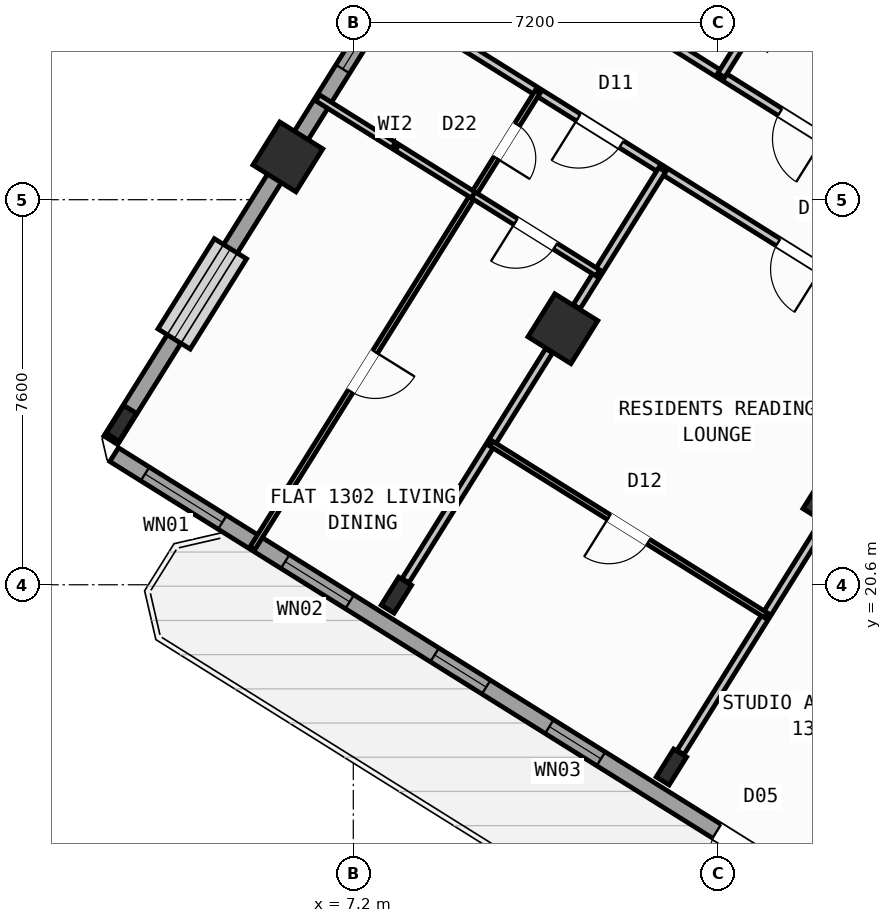
"""IFC4 building model, lengths in metres.
Left out: names, types, materials, properties, quantities, classifications, styles, units other than length and angle.
Written with IfcOpenShell. Run it as: python <this file> out.ifc"""

import sys

from ifc_helpers import new_model, si_unit, direction, frame, frame_2d, origin, origin_2d, place, context, subcontext, project, spatial, rectangle, hollow_rectangle, i_section, extrude, source, transform, mapped, element, fill, save


model = new_model("IFC4")
c1 = context("Model", 3, precision=1e-05, world=origin(), true_north=direction((0.0, 1.0)))
c2 = subcontext(c1, "Body", "Model", "MODEL_VIEW")
j1 = project(units=[si_unit("LENGTHUNIT", "METRE"), si_unit("PLANEANGLEUNIT", "RADIAN")], contexts=[c1])
p1 = place(None, origin())
s1 = spatial("IfcSite", under=j1, at=p1, CompositionType="ELEMENT")
p2 = place(p1, origin())
s2 = spatial("IfcBuilding", under=s1, at=p2, CompositionType="ELEMENT")
p3 = place(p2, frame((0.0, 0.0, 52.8)))
s3 = spatial("IfcBuildingStorey", under=s2, at=p3, CompositionType="ELEMENT", Elevation=52.8)
m1 = source(origin(), c2, "Body", "SweptSolid", [
    extrude(hollow_rectangle(XDim=1.0, YDim=1.0, WallThickness=0.04, at=origin_2d()), origin(), (0.0, 0.0, 1.0), 3.6),
])
p4 = place(p3, frame((16.764, 22.261, 0.0), z_axis=(0.0, 0.0, 1.0), x_axis=(-0.848048096156, 0.529919264233, 0.0)))
e1 = element("IfcColumn", 1, at=p4, inside=s3, PredefinedType="COLUMN", context=c2, shape_type="MappedRepresentation", body=[
    mapped(m1, transform((0.0, 0.0, 0.0), scale=1.0)),
])
m2 = source(origin(), c2, "Body", "SweptSolid", [
    extrude(i_section(OverallWidth=0.3, OverallDepth=0.65, WebThickness=0.016, FlangeThickness=0.031, at=origin_2d()), origin(), (0.0, 0.0, 1.0), 3.6),
])
p5 = place(p3, frame((13.478, 17.003, 0.0), z_axis=(0.0, 0.0, 1.0), x_axis=(-0.848048096156, 0.529919264233, 0.0)))
e2 = element("IfcColumn", 2, at=p5, inside=s3, PredefinedType="COLUMN", context=c2, shape_type="MappedRepresentation", body=[
    mapped(m2, transform((0.0, 0.0, 0.0), scale=1.0)),
])
p6 = place(p3, frame((11.336, 25.653, 0.0), z_axis=(0.0, 0.0, 1.0), x_axis=(-0.848048096156, 0.529919264233, 0.0)))
e3 = element("IfcColumn", 3, at=p6, inside=s3, PredefinedType="COLUMN", context=c2, shape_type="MappedRepresentation", body=[
    mapped(m1, transform((0.0, 0.0, 0.0), scale=1.0)),
])
p7 = place(p3, frame((8.051, 20.395, 0.0), z_axis=(0.0, 0.0, 1.0), x_axis=(-0.848048096156, 0.529919264233, 0.0)))
e4 = element("IfcColumn", 4, at=p7, inside=s3, PredefinedType="COLUMN", context=c2, shape_type="MappedRepresentation", body=[
    mapped(m2, transform((0.0, 0.0, 0.0), scale=1.0)),
])
p8 = place(p3, frame((5.909, 29.044, 0.0), z_axis=(0.0, 0.0, 1.0), x_axis=(-0.848048096156, 0.529919264233, 0.0)))
e5 = element("IfcColumn", 5, at=p8, inside=s3, PredefinedType="COLUMN", context=c2, shape_type="MappedRepresentation", body=[
    mapped(m1, transform((0.0, 0.0, 0.0), scale=1.0)),
])
p9 = place(p3, frame((2.623, 23.786, 0.0), z_axis=(0.0, 0.0, 1.0), x_axis=(-0.848048096156, 0.529919264233, 0.0)))
e6 = element("IfcColumn", 6, at=p9, inside=s3, PredefinedType="COLUMN", context=c2, shape_type="MappedRepresentation", body=[
    mapped(m2, transform((0.0, 0.0, 0.0), scale=1.0)),
])
p10 = place(p3, frame((29.268, 6.429, 0.0), z_axis=(0.0, 0.0, 1.0), x_axis=(-0.848049971435, 0.529916263149, 0.0)))
e7 = element("IfcWall", 7, at=p10, inside=s3, PredefinedType="STANDARD", context=c2, shape_type="SweptSolid", body=[
    extrude(rectangle(XDim=31.588, YDim=0.32, at=frame_2d((15.794, 0.0))), origin(), (0.0, 0.0, 1.0), 3.35),
])
p11 = place(p10, frame((16.362, 0.0, 0.0)))
e8 = element("IfcOpeningElement", 8, at=p11, cuts=e7, PredefinedType="OPENING", context=c2, shape_type="SweptSolid", body=[
    extrude(rectangle(XDim=1.2, YDim=2.15, at=frame_2d((0.6, 1.075))), frame((0.0, 0.17, 0.0), z_axis=(0.0, -1.0, 0.0), x_axis=(1.0, 0.0, 0.0)), (0.0, 0.0, 1.0), 0.34),
])
p12 = place(p10, frame((2.989, 0.0, 0.8)))
e9 = element("IfcOpeningElement", 9, at=p12, cuts=e7, PredefinedType="OPENING", context=c2, shape_type="SweptSolid", body=[
    extrude(rectangle(XDim=2.1, YDim=1.55, at=frame_2d((1.05, 0.775))), frame((0.0, 0.17, 0.0), z_axis=(0.0, -1.0, 0.0), x_axis=(1.0, 0.0, 0.0)), (0.0, 0.0, 1.0), 0.34),
])
p13 = place(p10, frame((8.359, 0.0, 0.8)))
e10 = element("IfcOpeningElement", 10, at=p13, cuts=e7, PredefinedType="OPENING", context=c2, shape_type="SweptSolid", body=[
    extrude(rectangle(XDim=2.1, YDim=1.55, at=frame_2d((1.05, 0.775))), frame((0.0, 0.17, 0.0), z_axis=(0.0, -1.0, 0.0), x_axis=(1.0, 0.0, 0.0)), (0.0, 0.0, 1.0), 0.34),
])
p14 = place(p10, frame((13.284, 0.0, 0.95)))
e11 = element("IfcOpeningElement", 11, at=p14, cuts=e7, PredefinedType="OPENING", context=c2, shape_type="SweptSolid", body=[
    extrude(rectangle(XDim=1.2, YDim=1.4, at=frame_2d((0.6, 0.7))), frame((0.0, 0.17, 0.0), z_axis=(0.0, -1.0, 0.0), x_axis=(1.0, 0.0, 0.0)), (0.0, 0.0, 1.0), 0.34),
])
p15 = place(p10, frame((20.259, 0.0, 0.95)))
e12 = element("IfcOpeningElement", 12, at=p15, cuts=e7, PredefinedType="OPENING", context=c2, shape_type="SweptSolid", body=[
    extrude(rectangle(XDim=1.2, YDim=1.4, at=frame_2d((0.6, 0.7))), frame((0.0, 0.17, 0.0), z_axis=(0.0, -1.0, 0.0), x_axis=(1.0, 0.0, 0.0)), (0.0, 0.0, 1.0), 0.34),
])
p16 = place(p10, frame((22.929, 0.0, 0.95)))
e13 = element("IfcOpeningElement", 13, at=p16, cuts=e7, PredefinedType="OPENING", context=c2, shape_type="SweptSolid", body=[
    extrude(rectangle(XDim=1.2, YDim=1.4, at=frame_2d((0.6, 0.7))), frame((0.0, 0.17, 0.0), z_axis=(0.0, -1.0, 0.0), x_axis=(1.0, 0.0, 0.0)), (0.0, 0.0, 1.0), 0.34),
])
p17 = place(p10, frame((26.106, 0.0, 0.85)))
e14 = element("IfcOpeningElement", 14, at=p17, cuts=e7, PredefinedType="OPENING", context=c2, shape_type="SweptSolid", body=[
    extrude(rectangle(XDim=1.5, YDim=1.5, at=frame_2d((0.75, 0.75))), frame((0.0, 0.17, 0.0), z_axis=(0.0, -1.0, 0.0), x_axis=(1.0, 0.0, 0.0)), (0.0, 0.0, 1.0), 0.34),
])
p18 = place(p10, frame((29.068, 0.0, 0.85)))
e15 = element("IfcOpeningElement", 15, at=p18, cuts=e7, PredefinedType="OPENING", context=c2, shape_type="SweptSolid", body=[
    extrude(rectangle(XDim=1.8, YDim=1.5, at=frame_2d((0.9, 0.75))), frame((0.0, 0.17, 0.0), z_axis=(0.0, -1.0, 0.0), x_axis=(1.0, 0.0, 0.0)), (0.0, 0.0, 1.0), 0.34),
])
p19 = place(p3, frame((2.415, 23.452, 0.0), z_axis=(0.0, 0.0, 1.0), x_axis=(0.52991049553, 0.848053575387, 0.0)))
e16 = element("IfcWall", 16, at=p19, inside=s3, PredefinedType="STANDARD", context=c2, shape_type="SweptSolid", body=[
    extrude(rectangle(XDim=21.587, YDim=0.32, at=frame_2d((10.794, 0.0))), origin(), (0.0, 0.0, 1.0), 2.725),
])
p20 = place(p19, frame((2.356, 0.0, 0.8)))
e17 = element("IfcOpeningElement", 17, at=p20, cuts=e16, PredefinedType="OPENING", context=c2, shape_type="SweptSolid", body=[
    extrude(rectangle(XDim=2.1, YDim=1.55, at=frame_2d((1.05, 0.775))), frame((0.0, 0.17, 0.0), z_axis=(0.0, -1.0, 0.0), x_axis=(1.0, 0.0, 0.0)), (0.0, 0.0, 1.0), 0.34),
])
p21 = place(p19, frame((8.639, 0.0, 1.0)))
e18 = element("IfcOpeningElement", 18, at=p21, cuts=e16, PredefinedType="OPENING", context=c2, shape_type="SweptSolid", body=[
    extrude(rectangle(XDim=0.9, YDim=1.25, at=frame_2d((0.45, 0.625))), frame((0.0, 0.17, 0.0), z_axis=(0.0, -1.0, 0.0), x_axis=(1.0, 0.0, 0.0)), (0.0, 0.0, 1.0), 0.34),
])
p22 = place(p19, frame((17.129, 0.0, 0.85)))
e19 = element("IfcOpeningElement", 19, at=p22, cuts=e16, PredefinedType="OPENING", context=c2, shape_type="SweptSolid", body=[
    extrude(rectangle(XDim=1.5, YDim=1.5, at=frame_2d((0.75, 0.75))), frame((0.0, 0.17, 0.0), z_axis=(0.0, -1.0, 0.0), x_axis=(1.0, 0.0, 0.0)), (0.0, 0.0, 1.0), 0.34),
])
p23 = place(p3, frame((14.138, 41.825, 0.0), z_axis=(0.0, 0.0, 1.0), x_axis=(0.848046498049, -0.529921821731, 0.0)))
e20 = element("IfcWall", 20, at=p23, inside=s3, PredefinedType="STANDARD", context=c2, shape_type="SweptSolid", body=[
    extrude(rectangle(XDim=31.588, YDim=0.32, at=frame_2d((15.794, 0.0))), origin(), (0.0, 0.0, 1.0), 3.35),
])
p24 = place(p23, frame((3.159, 0.0, 0.0)))
e21 = element("IfcOpeningElement", 21, at=p24, cuts=e20, PredefinedType="OPENING", context=c2, shape_type="SweptSolid", body=[
    extrude(rectangle(XDim=1.05, YDim=2.15, at=frame_2d((0.525, 1.075))), frame((0.0, 0.17, 0.0), z_axis=(0.0, -1.0, 0.0), x_axis=(1.0, 0.0, 0.0)), (0.0, 0.0, 1.0), 0.34),
])
p25 = place(p23, frame((0.906, 0.0, 1.0)))
e22 = element("IfcOpeningElement", 22, at=p25, cuts=e20, PredefinedType="OPENING", context=c2, shape_type="SweptSolid", body=[
    extrude(rectangle(XDim=0.9, YDim=1.25, at=frame_2d((0.45, 0.625))), frame((0.0, 0.17, 0.0), z_axis=(0.0, -1.0, 0.0), x_axis=(1.0, 0.0, 0.0)), (0.0, 0.0, 1.0), 0.34),
])
p26 = place(p23, frame((9.537, 0.0, 0.85)))
e23 = element("IfcOpeningElement", 23, at=p26, cuts=e20, PredefinedType="OPENING", context=c2, shape_type="SweptSolid", body=[
    extrude(rectangle(XDim=1.8, YDim=1.5, at=frame_2d((0.9, 0.75))), frame((0.0, 0.17, 0.0), z_axis=(0.0, -1.0, 0.0), x_axis=(1.0, 0.0, 0.0)), (0.0, 0.0, 1.0), 0.34),
])
p27 = place(p23, frame((13.899, 0.0, 0.85)))
e24 = element("IfcOpeningElement", 24, at=p27, cuts=e20, PredefinedType="OPENING", context=c2, shape_type="SweptSolid", body=[
    extrude(rectangle(XDim=1.5, YDim=1.5, at=frame_2d((0.75, 0.75))), frame((0.0, 0.17, 0.0), z_axis=(0.0, -1.0, 0.0), x_axis=(1.0, 0.0, 0.0)), (0.0, 0.0, 1.0), 0.34),
])
p28 = place(p23, frame((22.019, 0.0, 0.95)))
e25 = element("IfcOpeningElement", 25, at=p28, cuts=e20, PredefinedType="OPENING", context=c2, shape_type="SweptSolid", body=[
    extrude(rectangle(XDim=1.2, YDim=1.4, at=frame_2d((0.6, 0.7))), frame((0.0, 0.17, 0.0), z_axis=(0.0, -1.0, 0.0), x_axis=(1.0, 0.0, 0.0)), (0.0, 0.0, 1.0), 0.34),
])
p29 = place(p23, frame((27.569, 0.0, 0.95)))
e26 = element("IfcOpeningElement", 26, at=p29, cuts=e20, PredefinedType="OPENING", context=c2, shape_type="SweptSolid", body=[
    extrude(rectangle(XDim=1.2, YDim=1.4, at=frame_2d((0.6, 0.7))), frame((0.0, 0.17, 0.0), z_axis=(0.0, -1.0, 0.0), x_axis=(1.0, 0.0, 0.0)), (0.0, 0.0, 1.0), 0.34),
])
p30 = place(p3, frame((23.104, 25.256, 0.0), z_axis=(0.0, 0.0, 1.0), x_axis=(-0.848041752158, 0.529929416617, 0.0)))
e27 = element("IfcWall", 27, at=p30, inside=s3, PredefinedType="PARTITIONING", context=c2, shape_type="SweptSolid", body=[
    extrude(rectangle(XDim=16.73, YDim=0.16, at=frame_2d((8.365, 0.0))), origin(), (0.0, 0.0, 1.0), 3.34),
])
p31 = place(p30, frame((1.395, 0.0, 0.0)))
e28 = element("IfcOpeningElement", 28, at=p31, cuts=e27, PredefinedType="OPENING", context=c2, shape_type="SweptSolid", body=[
    extrude(rectangle(XDim=1.0, YDim=2.1, at=frame_2d((0.5, 1.05))), frame((0.0, 0.09, 0.0), z_axis=(0.0, -1.0, 0.0), x_axis=(1.0, 0.0, 0.0)), (0.0, 0.0, 1.0), 0.18),
])
p32 = place(p30, frame((7.82, 0.0, 0.0)))
e29 = element("IfcOpeningElement", 29, at=p32, cuts=e27, PredefinedType="OPENING", context=c2, shape_type="SweptSolid", body=[
    extrude(rectangle(XDim=1.0, YDim=2.1, at=frame_2d((0.5, 1.05))), frame((0.0, 0.09, 0.0), z_axis=(0.0, -1.0, 0.0), x_axis=(1.0, 0.0, 0.0)), (0.0, 0.0, 1.0), 0.18),
])
p33 = place(p30, frame((14.76, 0.0, 0.0)))
e30 = element("IfcOpeningElement", 30, at=p33, cuts=e27, PredefinedType="OPENING", context=c2, shape_type="SweptSolid", body=[
    extrude(rectangle(XDim=1.0, YDim=2.1, at=frame_2d((0.5, 1.05))), frame((0.0, 0.09, 0.0), z_axis=(0.0, -1.0, 0.0), x_axis=(1.0, 0.0, 0.0)), (0.0, 0.0, 1.0), 0.18),
])
p34 = place(p3, frame((21.938, 23.391, 0.0), z_axis=(0.0, 0.0, 1.0), x_axis=(-0.848045850158, 0.529922858565, 0.0)))
e31 = element("IfcWall", 31, at=p34, inside=s3, PredefinedType="PARTITIONING", context=c2, shape_type="SweptSolid", body=[
    extrude(rectangle(XDim=16.73, YDim=0.16, at=frame_2d((8.365, 0.0))), origin(), (0.0, 0.0, 1.0), 3.34),
])
p35 = place(p34, frame((2.22, 0.0, 0.0)))
e32 = element("IfcOpeningElement", 32, at=p35, cuts=e31, PredefinedType="OPENING", context=c2, shape_type="SweptSolid", body=[
    extrude(rectangle(XDim=0.86, YDim=2.05, at=frame_2d((0.43, 1.025))), frame((0.0, 0.09, 0.0), z_axis=(0.0, -1.0, 0.0), x_axis=(1.0, 0.0, 0.0)), (0.0, 0.0, 1.0), 0.18),
])
p36 = place(p34, frame((6.49, 0.0, 0.0)))
e33 = element("IfcOpeningElement", 33, at=p36, cuts=e31, PredefinedType="OPENING", context=c2, shape_type="SweptSolid", body=[
    extrude(rectangle(XDim=1.0, YDim=2.1, at=frame_2d((0.5, 1.05))), frame((0.0, 0.09, 0.0), z_axis=(0.0, -1.0, 0.0), x_axis=(1.0, 0.0, 0.0)), (0.0, 0.0, 1.0), 0.18),
])
p37 = place(p34, frame((11.14, 0.0, 0.0)))
e34 = element("IfcOpeningElement", 34, at=p37, cuts=e31, PredefinedType="OPENING", context=c2, shape_type="SweptSolid", body=[
    extrude(rectangle(XDim=1.0, YDim=2.1, at=frame_2d((0.5, 1.05))), frame((0.0, 0.09, 0.0), z_axis=(0.0, -1.0, 0.0), x_axis=(1.0, 0.0, 0.0)), (0.0, 0.0, 1.0), 0.18),
])
p38 = place(p3, frame((16.492, 21.827, 0.0), z_axis=(0.0, 0.0, 1.0), x_axis=(-0.529904608059, -0.848057254175, 0.0)))
e35 = element("IfcWall", 35, at=p38, inside=s3, PredefinedType="PARTITIONING", context=c2, shape_type="SweptSolid", body=[
    extrude(rectangle(XDim=5.351, YDim=0.16, at=frame_2d((2.675, 0.0))), origin(), (0.0, 0.0, 1.0), 2.725),
])
p39 = place(p3, frame((13.297, 28.791, 0.0), z_axis=(0.0, 0.0, 1.0), x_axis=(-0.529930102756, -0.848041323399, 0.0)))
e36 = element("IfcWall", 36, at=p39, inside=s3, PredefinedType="PARTITIONING", context=c2, shape_type="SweptSolid", body=[
    extrude(rectangle(XDim=3.188, YDim=0.16, at=frame_2d((1.594, 0.0))), origin(), (0.0, 0.0, 1.0), 2.725),
])
p40 = place(p3, frame((11.065, 25.219, 0.0), z_axis=(0.0, 0.0, 1.0), x_axis=(-0.529904608059, -0.848057254175, 0.0)))
e37 = element("IfcWall", 37, at=p40, inside=s3, PredefinedType="PARTITIONING", context=c2, shape_type="SweptSolid", body=[
    extrude(rectangle(XDim=5.351, YDim=0.16, at=frame_2d((2.675, 0.0))), origin(), (0.0, 0.0, 1.0), 2.725),
])
p41 = place(p3, frame((15.348, 19.995, 0.0), z_axis=(0.0, 0.0, 1.0), x_axis=(-0.848056163074, 0.529906354247, 0.0)))
e38 = element("IfcWall", 38, at=p41, inside=s3, PredefinedType="PARTITIONING", context=c2, shape_type="SweptSolid", body=[
    extrude(rectangle(XDim=6.4, YDim=0.11, at=frame_2d((3.2, 0.0))), origin(), (0.0, 0.0, 1.0), 3.34),
])
p42 = place(p41, frame((2.74, 0.0, 0.0)))
e39 = element("IfcOpeningElement", 39, at=p42, cuts=e38, PredefinedType="OPENING", context=c2, shape_type="SweptSolid", body=[
    extrude(rectangle(XDim=0.92, YDim=2.08, at=frame_2d((0.46, 1.04))), frame((0.0, 0.065, 0.0), z_axis=(0.0, -1.0, 0.0), x_axis=(1.0, 0.0, 0.0)), (0.0, 0.0, 1.0), 0.13),
])
p43 = place(p3, frame((10.837, 30.327, 0.0), z_axis=(0.0, 0.0, 1.0), x_axis=(-0.529912148489, -0.848052542525, 0.0)))
e40 = element("IfcWall", 40, at=p43, inside=s3, PredefinedType="PARTITIONING", context=c2, shape_type="SweptSolid", body=[
    extrude(rectangle(XDim=10.62, YDim=0.11, at=frame_2d((5.31, 0.0))), origin(), (0.0, 0.0, 1.0), 3.34),
])
p44 = place(p43, frame((0.76, 0.0, 0.0)))
e41 = element("IfcOpeningElement", 41, at=p44, cuts=e40, PredefinedType="OPENING", context=c2, shape_type="SweptSolid", body=[
    extrude(rectangle(XDim=0.78, YDim=2.05, at=frame_2d((0.39, 1.025))), frame((0.0, 0.065, 0.0), z_axis=(0.0, -1.0, 0.0), x_axis=(1.0, 0.0, 0.0)), (0.0, 0.0, 1.0), 0.13),
])
p45 = place(p43, frame((6.05, 0.0, 0.0)))
e42 = element("IfcOpeningElement", 42, at=p45, cuts=e40, PredefinedType="OPENING", context=c2, shape_type="SweptSolid", body=[
    extrude(rectangle(XDim=0.92, YDim=2.08, at=frame_2d((0.46, 1.04))), frame((0.0, 0.065, 0.0), z_axis=(0.0, -1.0, 0.0), x_axis=(1.0, 0.0, 0.0)), (0.0, 0.0, 1.0), 0.13),
])
p46 = place(p3, frame((12.025, 26.755, 0.0), z_axis=(0.0, 0.0, 1.0), x_axis=(-0.848059786386, 0.529900555496, 0.0)))
e43 = element("IfcWall", 43, at=p46, inside=s3, PredefinedType="PLUMBINGWALL", context=c2, shape_type="SweptSolid", body=[
    extrude(rectangle(XDim=2.9, YDim=0.14, at=frame_2d((1.45, 0.0))), origin(), (0.0, 0.0, 1.0), 3.34),
])
p47 = place(p46, frame((0.99, 0.0, 0.0)))
e44 = element("IfcOpeningElement", 44, at=p47, cuts=e43, PredefinedType="OPENING", context=c2, shape_type="SweptSolid", body=[
    extrude(rectangle(XDim=0.92, YDim=2.08, at=frame_2d((0.46, 1.04))), frame((0.0, 0.08, 0.0), z_axis=(0.0, -1.0, 0.0), x_axis=(1.0, 0.0, 0.0)), (0.0, 0.0, 1.0), 0.16),
])
p48 = place(p3, frame((9.566, 28.292, 0.0), z_axis=(0.0, 0.0, 1.0), x_axis=(-0.848021036626, 0.529962566074, 0.0)))
e45 = element("IfcWall", 45, at=p48, inside=s3, PredefinedType="PLUMBINGWALL", context=c2, shape_type="SweptSolid", body=[
    extrude(rectangle(XDim=3.62, YDim=0.14, at=frame_2d((1.81, 0.0))), origin(), (0.0, 0.0, 1.0), 3.34),
])
p49 = place(p3, frame((14.933, 31.409, 0.0), z_axis=(0.0, 0.0, 1.0), x_axis=(-0.529776512202, -0.848137280821, 0.0)))
e46 = element("IfcWall", 46, at=p49, inside=s3, PredefinedType="PARTITIONING", context=c2, shape_type="SweptSolid", body=[
    extrude(rectangle(XDim=0.888, YDim=0.16, at=frame_2d((0.444, 0.0))), origin(), (0.0, 0.0, 1.0), 2.725),
])
m3 = source(origin(), c2, "Body", "SweptSolid", [
    extrude(rectangle(XDim=1.2, YDim=2.15, at=frame_2d((0.6, 1.075))), frame((0.0, 0.025, 0.0), z_axis=(0.0, -1.0, 0.0), x_axis=(1.0, 0.0, 0.0)), (0.0, 0.0, 1.0), 0.05),
])
p50 = place(p11, origin())
e47 = element("IfcDoor", 47, at=p50, inside=s3, OperationType="SINGLE_SWING_LEFT", PredefinedType="DOOR", context=c2, shape_type="MappedRepresentation", body=[
    mapped(m3, transform((0.0, 0.0, 0.0), scale=1.0)),
])
fill(e8, e47)
m4 = source(origin(), c2, "Body", "SweptSolid", [
    extrude(rectangle(XDim=1.2, YDim=1.4, at=frame_2d((0.6, 0.7))), frame((0.0, 0.03, 0.0), z_axis=(0.0, -1.0, 0.0), x_axis=(1.0, 0.0, 0.0)), (0.0, 0.0, 1.0), 0.06),
])
p51 = place(p15, origin())
e48 = element("IfcWindow", 48, at=p51, inside=s3, PartitioningType="SINGLE_PANEL", PredefinedType="WINDOW", context=c2, shape_type="MappedRepresentation", body=[
    mapped(m4, transform((0.0, 0.0, 0.0), scale=1.0)),
])
fill(e12, e48)
p52 = place(p16, origin())
e49 = element("IfcWindow", 49, at=p52, inside=s3, PartitioningType="SINGLE_PANEL", PredefinedType="WINDOW", context=c2, shape_type="MappedRepresentation", body=[
    mapped(m4, transform((0.0, 0.0, 0.0), scale=1.0)),
])
fill(e13, e49)
m5 = source(origin(), c2, "Body", "SweptSolid", [
    extrude(rectangle(XDim=1.5, YDim=1.5, at=frame_2d((0.75, 0.75))), frame((0.0, 0.03, 0.0), z_axis=(0.0, -1.0, 0.0), x_axis=(1.0, 0.0, 0.0)), (0.0, 0.0, 1.0), 0.06),
])
p53 = place(p17, origin())
e50 = element("IfcWindow", 50, at=p53, inside=s3, PartitioningType="SINGLE_PANEL", PredefinedType="WINDOW", context=c2, shape_type="MappedRepresentation", body=[
    mapped(m5, transform((0.0, 0.0, 0.0), scale=1.0)),
])
fill(e14, e50)
m6 = source(origin(), c2, "Body", "SweptSolid", [
    extrude(rectangle(XDim=1.8, YDim=1.5, at=frame_2d((0.9, 0.75))), frame((0.0, 0.03, 0.0), z_axis=(0.0, -1.0, 0.0), x_axis=(1.0, 0.0, 0.0)), (0.0, 0.0, 1.0), 0.06),
])
p54 = place(p18, origin())
e51 = element("IfcWindow", 51, at=p54, inside=s3, PartitioningType="SINGLE_PANEL", PredefinedType="WINDOW", context=c2, shape_type="MappedRepresentation", body=[
    mapped(m6, transform((0.0, 0.0, 0.0), scale=1.0)),
])
fill(e15, e51)
m7 = source(origin(), c2, "Body", "SweptSolid", [
    extrude(rectangle(XDim=2.1, YDim=1.55, at=frame_2d((1.05, 0.775))), frame((0.0, 0.03, 0.0), z_axis=(0.0, -1.0, 0.0), x_axis=(1.0, 0.0, 0.0)), (0.0, 0.0, 1.0), 0.06),
])
p55 = place(p20, origin())
e52 = element("IfcWindow", 52, at=p55, inside=s3, PartitioningType="SINGLE_PANEL", PredefinedType="WINDOW", context=c2, shape_type="MappedRepresentation", body=[
    mapped(m7, transform((0.0, 0.0, 0.0), scale=1.0)),
])
fill(e17, e52)
m8 = source(origin(), c2, "Body", "SweptSolid", [
    extrude(rectangle(XDim=0.9, YDim=1.25, at=frame_2d((0.45, 0.625))), frame((0.0, 0.03, 0.0), z_axis=(0.0, -1.0, 0.0), x_axis=(1.0, 0.0, 0.0)), (0.0, 0.0, 1.0), 0.06),
])
p56 = place(p21, origin())
e53 = element("IfcWindow", 53, at=p56, inside=s3, PartitioningType="SINGLE_PANEL", PredefinedType="WINDOW", context=c2, shape_type="MappedRepresentation", body=[
    mapped(m8, transform((0.0, 0.0, 0.0), scale=1.0)),
])
fill(e18, e53)
m9 = source(origin(), c2, "Body", "SweptSolid", [
    extrude(rectangle(XDim=1.0, YDim=2.1, at=frame_2d((0.5, 1.05))), frame((0.0, 0.025, 0.0), z_axis=(0.0, -1.0, 0.0), x_axis=(1.0, 0.0, 0.0)), (0.0, 0.0, 1.0), 0.05),
])
p57 = place(p36, origin())
e54 = element("IfcDoor", 54, at=p57, inside=s3, OperationType="SINGLE_SWING_LEFT", PredefinedType="DOOR", context=c2, shape_type="MappedRepresentation", body=[
    mapped(m9, transform((0.0, 0.0, 0.0), scale=1.0)),
])
fill(e33, e54)
m10 = source(origin(), c2, "Body", "SweptSolid", [
    extrude(rectangle(XDim=0.92, YDim=2.08, at=frame_2d((0.46, 1.04))), frame((0.0, 0.025, 0.0), z_axis=(0.0, -1.0, 0.0), x_axis=(1.0, 0.0, 0.0)), (0.0, 0.0, 1.0), 0.05),
])
p58 = place(p42, origin())
e55 = element("IfcDoor", 55, at=p58, inside=s3, OperationType="SINGLE_SWING_RIGHT", PredefinedType="DOOR", context=c2, shape_type="MappedRepresentation", body=[
    mapped(m10, transform((0.0, 0.0, 0.0), scale=1.0)),
])
fill(e39, e55)
p59 = place(p37, origin())
e56 = element("IfcDoor", 56, at=p59, inside=s3, OperationType="SINGLE_SWING_RIGHT", PredefinedType="DOOR", context=c2, shape_type="MappedRepresentation", body=[
    mapped(m9, transform((0.0, 0.0, 0.0), scale=1.0)),
])
fill(e34, e56)
p60 = place(p47, origin())
e57 = element("IfcDoor", 57, at=p60, inside=s3, OperationType="SINGLE_SWING_RIGHT", PredefinedType="DOOR", context=c2, shape_type="MappedRepresentation", body=[
    mapped(m10, transform((0.0, 0.0, 0.0), scale=1.0)),
])
fill(e44, e57)
m11 = source(origin(), c2, "Body", "SweptSolid", [
    extrude(rectangle(XDim=0.78, YDim=2.05, at=frame_2d((0.39, 1.025))), frame((0.0, 0.025, 0.0), z_axis=(0.0, -1.0, 0.0), x_axis=(1.0, 0.0, 0.0)), (0.0, 0.0, 1.0), 0.05),
])
p61 = place(p44, origin())
e58 = element("IfcDoor", 58, at=p61, inside=s3, OperationType="SINGLE_SWING_RIGHT", PredefinedType="DOOR", context=c2, shape_type="MappedRepresentation", body=[
    mapped(m11, transform((0.0, 0.0, 0.0), scale=1.0)),
])
fill(e41, e58)
p62 = place(p45, origin())
e59 = element("IfcDoor", 59, at=p62, inside=s3, OperationType="SINGLE_SWING_LEFT", PredefinedType="DOOR", context=c2, shape_type="MappedRepresentation", body=[
    mapped(m10, transform((0.0, 0.0, 0.0), scale=1.0)),
])
fill(e42, e59)
p63 = place(p32, origin())
e60 = element("IfcDoor", 60, at=p63, inside=s3, OperationType="SINGLE_SWING_LEFT", PredefinedType="DOOR", context=c2, shape_type="MappedRepresentation", body=[
    mapped(m9, transform((0.0, 0.0, 0.0), scale=1.0)),
])
fill(e29, e60)
save(model, sys.argv[1])
